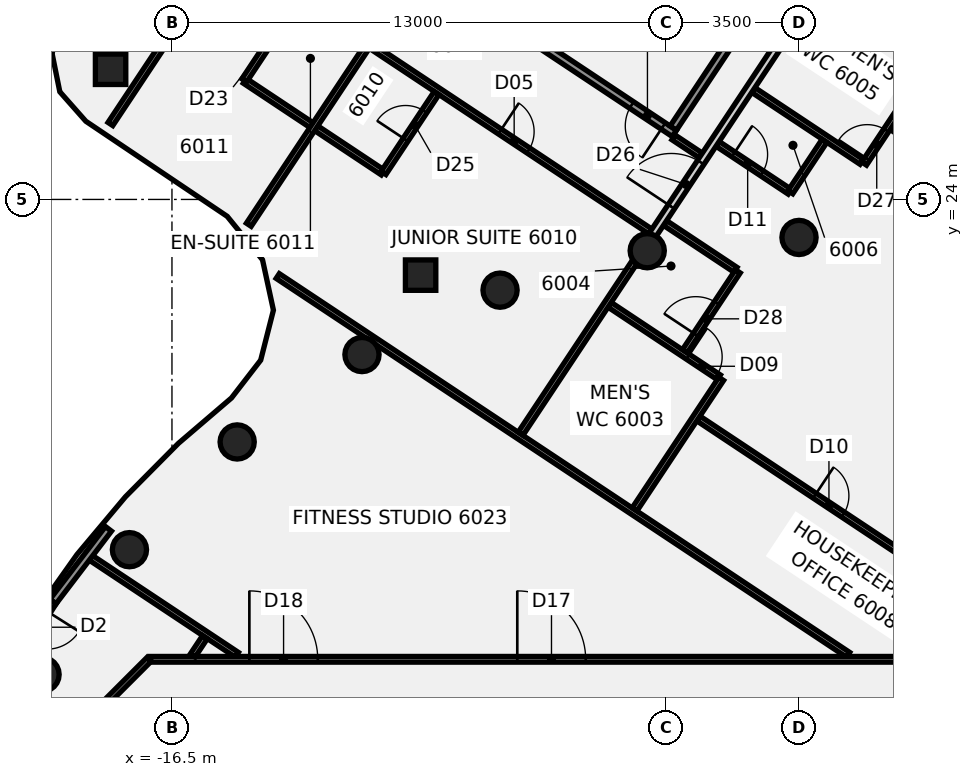
"""IFC4 building model, lengths in metres.
Left out: names, types, materials, properties, quantities, classifications, styles, units other than length and angle.
Written with IfcOpenShell. Run it as: python <this file> out.ifc"""

import sys

from ifc_helpers import new_model, si_unit, direction, frame, frame_2d, origin, origin_2d, place, context, subcontext, project, spatial, rectangle, circle, extrude, element, fill, save


model = new_model("IFC4")
c1 = context("Model", 3, precision=1e-05, world=origin(), true_north=direction((0.0, 1.0)))
c2 = subcontext(c1, "Body", "Model", "MODEL_VIEW")
j1 = project(units=[si_unit("LENGTHUNIT", "METRE"), si_unit("PLANEANGLEUNIT", "RADIAN")], contexts=[c1])
p1 = place(None, origin())
s1 = spatial("IfcSite", under=j1, at=p1, CompositionType="ELEMENT")
p2 = place(p1, origin())
s2 = spatial("IfcBuilding", under=s1, at=p2, CompositionType="ELEMENT")
p3 = place(p2, frame((0.0, 0.0, 237.9)))
s3 = spatial("IfcBuildingStorey", under=s2, at=p3, CompositionType="ELEMENT", Elevation=237.9)
for number, where, z_axis, x_axis in (
    (1, (0.0, 23.0, -0.14), (0.0, 0.0, 1.0), (1.0, 0.0, 0.0)),
    (2, (-3.994, 22.651, -0.14), (0.0, 0.0, 1.0), (1.0, 0.0, 0.0)),
    (3, (-7.866, 21.613, -0.14), (0.0, 0.0, 1.0), (1.0, 0.0, 0.0)),
    (4, (-11.5, 19.919, -0.14), (0.0, 0.0, 1.0), (1.0, 0.0, 0.0)),
    (5, (-14.784, 17.619, -0.14), (0.0, 0.0, 1.0), (1.0, 0.0, 0.0)),
    (6, (-17.619, 14.784, -0.14), (0.0, 0.0, 1.0), (1.0, 0.0, 0.0)),
    (7, (-19.919, 11.5, -0.14), (0.0, 0.0, 1.0), (1.0, 0.0, 0.0)),
):
    element("IfcColumn", number, at=place(p3, frame(where, z_axis=z_axis, x_axis=x_axis)), inside=s3, PredefinedType="COLUMN", context=c2, shape_type="SweptSolid", body=[
        extrude(circle(Radius=0.45, at=origin_2d()), origin(), (0.0, 0.0, 1.0), 3.6),
    ])
p4 = place(p3, frame((-9.957, 22.009, -0.139), z_axis=(0.000406675654, -0.050427781113, 0.998727627287), x_axis=(0.553266552151, 0.831955767854, 0.0417818454)))
e8 = element("IfcColumn", 8, at=p4, inside=s3, PredefinedType="COLUMN", context=c2, shape_type="SweptSolid", body=[
    extrude(rectangle(XDim=0.8, YDim=0.8, at=origin_2d()), origin(), (0.0, 0.0, 1.0), 3.602),
])
p5 = place(p3, frame((-18.115, 27.425, -0.138), z_axis=(0.055423482647, -0.143054315985, 0.988161778379), x_axis=(0.555548549788, 0.826757793949, 0.088528859549)))
e9 = element("IfcColumn", 9, at=p5, inside=s3, PredefinedType="COLUMN", context=c2, shape_type="SweptSolid", body=[
    extrude(rectangle(XDim=0.8, YDim=0.8, at=origin_2d()), origin(), (0.0, 0.0, 1.0), 3.638),
])
p6 = place(p3, frame((-18.663, 14.589, 0.0), z_axis=(0.0, 0.0, 1.0), x_axis=(0.833043201899, -0.553207938997, 0.0)))
e10 = element("IfcWall", 10, at=p6, inside=s3, PredefinedType="PARTITIONING", context=c2, shape_type="SweptSolid", body=[
    extrude(rectangle(XDim=4.647, YDim=0.15, at=frame_2d((2.323, 0.0))), origin(), (0.0, 0.0, 1.0), 2.864),
])
p7 = place(p3, frame((-15.01, 30.525, 0.0), z_axis=(0.0, 0.0, 1.0), x_axis=(0.833117507286, -0.553096030589, 0.0)))
e11 = element("IfcWall", 11, at=p7, inside=s3, PredefinedType="PARTITIONING", context=c2, shape_type="SweptSolid", body=[
    extrude(rectangle(XDim=13.32, YDim=0.15, at=frame_2d((6.66, 0.0))), origin(), (0.0, 0.0, 1.0), 2.864),
])
p8 = place(p7, frame((8.569, 0.0, 0.0)))
e12 = element("IfcOpeningElement", 12, at=p8, cuts=e11, PredefinedType="OPENING", context=c2, shape_type="SweptSolid", body=[
    extrude(rectangle(XDim=0.9, YDim=2.1, at=frame_2d((0.45, 1.05))), frame((0.0, 0.085, 0.0), z_axis=(0.0, -1.0, 0.0), x_axis=(1.0, 0.0, 0.0)), (0.0, 0.0, 1.0), 0.17),
])
p9 = place(p7, frame((0.52, 0.0, 0.0)))
e13 = element("IfcOpeningElement", 13, at=p9, cuts=e11, PredefinedType="OPENING", context=c2, shape_type="SweptSolid", body=[
    extrude(rectangle(XDim=0.9, YDim=2.1, at=frame_2d((0.45, 1.05))), frame((0.0, 0.085, 0.0), z_axis=(0.0, -1.0, 0.0), x_axis=(1.0, 0.0, 0.0)), (0.0, 0.0, 1.0), 0.17),
])
p10 = place(p3, frame((-14.581, 27.12, 0.0), z_axis=(0.0, 0.0, 1.0), x_axis=(0.832953813906, -0.553342519511, 0.0)))
e14 = element("IfcWall", 14, at=p10, inside=s3, PredefinedType="PARTITIONING", context=c2, shape_type="SweptSolid", body=[
    extrude(rectangle(XDim=4.36, YDim=0.15, at=frame_2d((2.18, 0.0))), origin(), (0.0, 0.0, 1.0), 2.864),
])
p11 = place(p3, frame((-3.302, 25.633, 0.0), z_axis=(0.0, 0.0, 1.0), x_axis=(0.833097223734, -0.553126582084, 0.0)))
e15 = element("IfcWall", 15, at=p11, inside=s3, PredefinedType="PARTITIONING", context=c2, shape_type="SweptSolid", body=[
    extrude(rectangle(XDim=0.86, YDim=0.15, at=frame_2d((0.43, 0.0))), origin(), (0.0, 0.0, 1.0), 2.864),
])
p12 = place(p3, frame((-13.717, 21.985, 0.0), z_axis=(0.0, 0.0, 1.0), x_axis=(0.833087033507, -0.553141929891, 0.0)))
e16 = element("IfcWall", 16, at=p12, inside=s3, PredefinedType="PARTITIONING", context=c2, shape_type="SweptSolid", body=[
    extrude(rectangle(XDim=18.017, YDim=0.15, at=frame_2d((9.008, 0.0))), origin(), (0.0, 0.0, 1.0), 2.864),
])
p13 = place(p3, frame((-4.979, 21.225, 0.0), z_axis=(0.0, 0.0, 1.0), x_axis=(0.833117303945, -0.553096336877, 0.0)))
e17 = element("IfcWall", 17, at=p13, inside=s3, PredefinedType="PARTITIONING", context=c2, shape_type="SweptSolid", body=[
    extrude(rectangle(XDim=3.445, YDim=0.15, at=frame_2d((1.722, 0.0))), origin(), (0.0, 0.0, 1.0), 2.864),
])
p14 = place(p13, frame((2.469, 0.0, 0.0)))
e18 = element("IfcOpeningElement", 18, at=p14, cuts=e17, PredefinedType="OPENING", context=c2, shape_type="SweptSolid", body=[
    extrude(rectangle(XDim=0.9, YDim=2.1, at=frame_2d((0.45, 1.05))), frame((0.0, 0.085, 0.0), z_axis=(0.0, -1.0, 0.0), x_axis=(1.0, 0.0, 0.0)), (0.0, 0.0, 1.0), 0.17),
])
p15 = place(p3, frame((-3.525, 23.38, 0.0), z_axis=(0.0, 0.0, 1.0), x_axis=(0.83314621035, -0.553052793302, 0.0)))
e19 = element("IfcWall", 19, at=p15, inside=s3, PredefinedType="PARTITIONING", context=c2, shape_type="SweptSolid", body=[
    extrude(rectangle(XDim=2.224, YDim=0.15, at=frame_2d((1.112, 0.0))), origin(), (0.0, 0.0, 1.0), 2.864),
])
p16 = place(p3, frame((-2.644, 18.234, 0.0), z_axis=(0.0, 0.0, 1.0), x_axis=(0.833101748675, -0.553119766737, 0.0)))
e20 = element("IfcWall", 20, at=p16, inside=s3, PredefinedType="PARTITIONING", context=c2, shape_type="SweptSolid", body=[
    extrude(rectangle(XDim=11.236, YDim=0.15, at=frame_2d((5.618, 0.0))), origin(), (0.0, 0.0, 1.0), 2.864),
])
p17 = place(p16, frame((3.67, 0.0, 0.0)))
e21 = element("IfcOpeningElement", 21, at=p17, cuts=e20, PredefinedType="OPENING", context=c2, shape_type="SweptSolid", body=[
    extrude(rectangle(XDim=0.9, YDim=2.1, at=frame_2d((0.45, 1.05))), frame((0.0, 0.085, 0.0), z_axis=(0.0, -1.0, 0.0), x_axis=(1.0, 0.0, 0.0)), (0.0, 0.0, 1.0), 0.17),
])
p18 = place(p3, frame((-2.138, 25.46, 0.0), z_axis=(0.0, 0.0, 1.0), x_axis=(0.833269970846, -0.552866309053, 0.0)))
e22 = element("IfcWall", 22, at=p18, inside=s3, PredefinedType="PARTITIONING", context=c2, shape_type="SweptSolid", body=[
    extrude(rectangle(XDim=2.275, YDim=0.15, at=frame_2d((1.138, 0.0))), origin(), (0.0, 0.0, 1.0), 2.864),
])
p19 = place(p18, frame((0.495, 0.0, 0.0)))
e23 = element("IfcOpeningElement", 23, at=p19, cuts=e22, PredefinedType="OPENING", context=c2, shape_type="SweptSolid", body=[
    extrude(rectangle(XDim=0.9, YDim=2.1, at=frame_2d((0.45, 1.05))), frame((0.0, 0.085, 0.0), z_axis=(0.0, -1.0, 0.0), x_axis=(1.0, 0.0, 0.0)), (0.0, 0.0, 1.0), 0.17),
])
p20 = place(p3, frame((-1.202, 26.879, 0.0), z_axis=(0.0, 0.0, 1.0), x_axis=(0.8331360396, -0.55306811472, 0.0)))
e24 = element("IfcWall", 24, at=p20, inside=s3, PredefinedType="PARTITIONING", context=c2, shape_type="SweptSolid", body=[
    extrude(rectangle(XDim=3.42, YDim=0.15, at=frame_2d((1.71, 0.0))), origin(), (0.0, 0.0, 1.0), 2.864),
])
p21 = place(p3, frame((2.445, 25.899, 0.0), z_axis=(0.0, 0.0, 1.0), x_axis=(0.832974807339, -0.553310916519, 0.0)))
e25 = element("IfcWall", 25, at=p21, inside=s3, PredefinedType="PARTITIONING", context=c2, shape_type="SweptSolid", body=[
    extrude(rectangle(XDim=1.014, YDim=0.15, at=frame_2d((0.507, 0.0))), origin(), (0.0, 0.0, 1.0), 2.864),
])
p22 = place(p3, frame((-17.065, 11.9, 0.0), z_axis=(0.0, 0.0, 1.0), x_axis=(1.0, 0.0, 0.0)))
e26 = element("IfcWall", 26, at=p22, inside=s3, PredefinedType="PARTITIONING", context=c2, shape_type="SweptSolid", body=[
    extrude(rectangle(XDim=34.165, YDim=0.15, at=frame_2d((17.083, 0.0))), origin(), (0.0, 0.0, 1.0), 2.864),
])
p23 = place(p22, frame((24.711, 0.0, 0.0)))
e27 = element("IfcOpeningElement", 27, at=p23, cuts=e26, PredefinedType="OPENING", context=c2, shape_type="SweptSolid", body=[
    extrude(rectangle(XDim=1.8, YDim=2.1, at=frame_2d((0.9, 1.05))), frame((0.0, 0.085, 0.0), z_axis=(0.0, -1.0, 0.0), x_axis=(1.0, 0.0, 0.0)), (0.0, 0.0, 1.0), 0.17),
])
p24 = place(p22, frame((9.652, 0.0, 0.0)))
e28 = element("IfcOpeningElement", 28, at=p24, cuts=e26, PredefinedType="OPENING", context=c2, shape_type="SweptSolid", body=[
    extrude(rectangle(XDim=1.8, YDim=2.1, at=frame_2d((0.9, 1.05))), frame((0.0, 0.085, 0.0), z_axis=(0.0, -1.0, 0.0), x_axis=(1.0, 0.0, 0.0)), (0.0, 0.0, 1.0), 0.17),
])
p25 = place(p22, frame((2.602, 0.0, 0.0)))
e29 = element("IfcOpeningElement", 29, at=p25, cuts=e26, PredefinedType="OPENING", context=c2, shape_type="SweptSolid", body=[
    extrude(rectangle(XDim=1.8, YDim=2.1, at=frame_2d((0.9, 1.05))), frame((0.0, 0.085, 0.0), z_axis=(0.0, -1.0, 0.0), x_axis=(1.0, 0.0, 0.0)), (0.0, 0.0, 1.0), 0.17),
])
p26 = place(p3, frame((-18.872, 10.128, 0.0), z_axis=(0.0, 0.0, 1.0), x_axis=(0.707106781187, 0.707106781187, 0.0)))
e30 = element("IfcWall", 30, at=p26, inside=s3, PredefinedType="PARTITIONING", context=c2, shape_type="SweptSolid", body=[
    extrude(rectangle(XDim=2.505, YDim=0.15, at=frame_2d((1.253, 0.0))), origin(), (0.0, 0.0, 1.0), 2.864),
])
p27 = place(p3, frame((-15.954, 12.0, 0.0), z_axis=(0.0, 0.0, 1.0), x_axis=(0.55314016621, 0.833088204529, 0.0)))
e31 = element("IfcWall", 31, at=p27, inside=s3, PredefinedType="PARTITIONING", context=c2, shape_type="SweptSolid", body=[
    extrude(rectangle(XDim=0.578, YDim=0.15, at=frame_2d((0.289, 0.0))), origin(), (0.0, 0.0, 1.0), 2.864),
])
p28 = place(p3, frame((-18.119, 25.985, 0.0), z_axis=(0.0, 0.0, 1.0), x_axis=(0.55309744158, 0.833116570546, 0.0)))
e32 = element("IfcWall", 32, at=p28, inside=s3, PredefinedType="PARTITIONING", context=c2, shape_type="SweptSolid", body=[
    extrude(rectangle(XDim=13.402, YDim=0.15, at=frame_2d((6.701, 0.0))), origin(), (0.0, 0.0, 1.0), 2.864),
])
p29 = place(p28, frame((2.429, 0.0, 0.0)))
e33 = element("IfcOpeningElement", 33, at=p29, cuts=e32, PredefinedType="OPENING", context=c2, shape_type="SweptSolid", body=[
    extrude(rectangle(XDim=1.8, YDim=2.1, at=frame_2d((0.9, 1.05))), frame((0.0, 0.085, 0.0), z_axis=(0.0, -1.0, 0.0), x_axis=(1.0, 0.0, 0.0)), (0.0, 0.0, 1.0), 0.17),
])
p30 = place(p3, frame((-14.598, 27.131, 0.0), z_axis=(0.0, 0.0, 1.0), x_axis=(0.553111776715, 0.83310705342, 0.0)))
e34 = element("IfcWall", 34, at=p30, inside=s3, PredefinedType="PARTITIONING", context=c2, shape_type="SweptSolid", body=[
    extrude(rectangle(XDim=2.52, YDim=0.15, at=frame_2d((1.26, 0.0))), origin(), (0.0, 0.0, 1.0), 2.864),
])
p31 = place(p30, frame((1.05, 0.0, 0.0)))
e35 = element("IfcOpeningElement", 35, at=p31, cuts=e34, PredefinedType="OPENING", context=c2, shape_type="SweptSolid", body=[
    extrude(rectangle(XDim=0.9, YDim=2.1, at=frame_2d((0.45, 1.05))), frame((0.0, 0.085, 0.0), z_axis=(0.0, -1.0, 0.0), x_axis=(1.0, 0.0, 0.0)), (0.0, 0.0, 1.0), 0.17),
])
p32 = place(p3, frame((-14.479, 23.334, 0.0), z_axis=(0.0, 0.0, 1.0), x_axis=(0.553003913991, 0.833178654978, 0.0)))
e36 = element("IfcWall", 36, at=p32, inside=s3, PredefinedType="PARTITIONING", context=c2, shape_type="SweptSolid", body=[
    extrude(rectangle(XDim=5.617, YDim=0.15, at=frame_2d((2.809, 0.0))), origin(), (0.0, 0.0, 1.0), 2.864),
])
p33 = place(p3, frame((-10.933, 24.697, 0.0), z_axis=(0.0, 0.0, 1.0), x_axis=(0.553111776715, 0.83310705342, 0.0)))
e37 = element("IfcWall", 37, at=p33, inside=s3, PredefinedType="PARTITIONING", context=c2, shape_type="SweptSolid", body=[
    extrude(rectangle(XDim=2.52, YDim=0.15, at=frame_2d((1.26, 0.0))), origin(), (0.0, 0.0, 1.0), 2.864),
])
p34 = place(p33, frame((1.05, 0.0, 0.0)))
e38 = element("IfcOpeningElement", 38, at=p34, cuts=e37, PredefinedType="OPENING", context=c2, shape_type="SweptSolid", body=[
    extrude(rectangle(XDim=0.9, YDim=2.1, at=frame_2d((0.45, 1.05))), frame((0.0, 0.085, 0.0), z_axis=(0.0, -1.0, 0.0), x_axis=(1.0, 0.0, 0.0)), (0.0, 0.0, 1.0), 0.17),
])
p35 = place(p3, frame((-7.325, 17.837, 0.0), z_axis=(0.0, 0.0, 1.0), x_axis=(0.553097438288, 0.833116572731, 0.0)))
e39 = element("IfcWall", 39, at=p35, inside=s3, PredefinedType="PARTITIONING", context=c2, shape_type="SweptSolid", body=[
    extrude(rectangle(XDim=5.628, YDim=0.15, at=frame_2d((2.814, 0.0))), origin(), (0.0, 0.0, 1.0), 2.864),
])
p36 = place(p3, frame((-3.963, 22.9, 0.0), z_axis=(0.0, 0.0, 1.0), x_axis=(0.553100489326, 0.833114547171, 0.0)))
e40 = element("IfcWall", 40, at=p36, inside=s3, PredefinedType="PARTITIONING", context=c2, shape_type="SweptSolid", body=[
    extrude(rectangle(XDim=8.141, YDim=0.2, at=frame_2d((4.07, 0.0))), origin(), (0.0, 0.0, 1.0), 2.864),
])
p37 = place(p36, frame((1.092, 0.0, 0.0)))
e41 = element("IfcOpeningElement", 41, at=p37, cuts=e40, PredefinedType="OPENING", context=c2, shape_type="SweptSolid", body=[
    extrude(rectangle(XDim=1.4, YDim=2.1, at=frame_2d((0.7, 1.05))), frame((0.0, 0.11, 0.0), z_axis=(0.0, -1.0, 0.0), x_axis=(1.0, 0.0, 0.0)), (0.0, 0.0, 1.0), 0.22),
])
p38 = place(p3, frame((-4.326, 15.846, 0.0), z_axis=(0.0, 0.0, 1.0), x_axis=(0.55307176982, 0.83313361319, 0.0)))
e42 = element("IfcWall", 42, at=p38, inside=s3, PredefinedType="PARTITIONING", context=c2, shape_type="SweptSolid", body=[
    extrude(rectangle(XDim=4.12, YDim=0.15, at=frame_2d((2.06, 0.0))), origin(), (0.0, 0.0, 1.0), 2.864),
])
p39 = place(p3, frame((1.714, 24.943, 0.0), z_axis=(0.0, 0.0, 1.0), x_axis=(0.55306516675, 0.833137996569, 0.0)))
e43 = element("IfcWall", 43, at=p39, inside=s3, PredefinedType="PARTITIONING", context=c2, shape_type="SweptSolid", body=[
    extrude(rectangle(XDim=2.483, YDim=0.15, at=frame_2d((1.241, 0.0))), origin(), (0.0, 0.0, 1.0), 2.864),
])
p40 = place(p39, frame((0.15, 0.0, 0.0)))
e44 = element("IfcOpeningElement", 44, at=p40, cuts=e43, PredefinedType="OPENING", context=c2, shape_type="SweptSolid", body=[
    extrude(rectangle(XDim=0.9, YDim=2.1, at=frame_2d((0.45, 1.05))), frame((0.0, 0.085, 0.0), z_axis=(0.0, -1.0, 0.0), x_axis=(1.0, 0.0, 0.0)), (0.0, 0.0, 1.0), 0.17),
])
p41 = place(p3, frame((-3.003, 20.009, 0.0), z_axis=(0.0, 0.0, 1.0), x_axis=(0.553111776715, 0.83310705342, 0.0)))
e45 = element("IfcWall", 45, at=p41, inside=s3, PredefinedType="PARTITIONING", context=c2, shape_type="SweptSolid", body=[
    extrude(rectangle(XDim=2.52, YDim=0.15, at=frame_2d((1.26, 0.0))), origin(), (0.0, 0.0, 1.0), 2.864),
])
p42 = place(p41, frame((0.52, 0.0, 0.0)))
e46 = element("IfcOpeningElement", 46, at=p42, cuts=e45, PredefinedType="OPENING", context=c2, shape_type="SweptSolid", body=[
    extrude(rectangle(XDim=1.0, YDim=2.1, at=frame_2d((0.5, 1.05))), frame((0.0, 0.085, 0.0), z_axis=(0.0, -1.0, 0.0), x_axis=(1.0, 0.0, 0.0)), (0.0, 0.0, 1.0), 0.17),
])
p43 = place(p3, frame((-0.226, 24.191, 0.0), z_axis=(0.0, 0.0, 1.0), x_axis=(0.55306417873, 0.83313865245, 0.0)))
e47 = element("IfcWall", 47, at=p43, inside=s3, PredefinedType="PARTITIONING", context=c2, shape_type="SweptSolid", body=[
    extrude(rectangle(XDim=1.62, YDim=0.15, at=frame_2d((0.81, 0.0))), origin(), (0.0, 0.0, 1.0), 2.864),
])
p44 = place(p3, frame((-18.171, 15.332, 0.0), z_axis=(0.0, 0.0, 1.0), x_axis=(-0.606394798993, -0.795163723867, 0.0)))
e48 = element("IfcWall", 48, at=p44, inside=s3, PredefinedType="SOLIDWALL", context=c2, shape_type="SweptSolid", body=[
    extrude(rectangle(XDim=2.406, YDim=0.2, at=frame_2d((1.203, 0.0))), origin(), (0.0, 0.0, 1.0), 3.46),
])
p45 = place(p3, frame((-19.63, 13.419, 0.0), z_axis=(0.0, 0.0, 1.0), x_axis=(-0.534630584226, -0.845085876352, 0.0)))
e49 = element("IfcWall", 49, at=p45, inside=s3, PredefinedType="SOLIDWALL", context=c2, shape_type="SweptSolid", body=[
    extrude(rectangle(XDim=1.599, YDim=0.2, at=frame_2d((0.799, 0.0))), origin(), (0.0, 0.0, 1.0), 3.46),
])
p46 = place(p45, frame((0.299, 0.0, 0.0)))
e50 = element("IfcOpeningElement", 50, at=p46, cuts=e49, PredefinedType="OPENING", context=c2, shape_type="SweptSolid", body=[
    extrude(rectangle(XDim=1.0, YDim=2.4, at=frame_2d((0.5, 1.2))), frame((0.0, 0.11, 0.0), z_axis=(0.0, -1.0, 0.0), x_axis=(1.0, 0.0, 0.0)), (0.0, 0.0, 1.0), 0.22),
])
p47 = place(p3, frame((-3.28, 25.738, -0.14), z_axis=(0.0, 0.0, 1.0), x_axis=(-0.833119462199, 0.553093085931, 0.0)))
e51 = element("IfcWall", 51, at=p47, inside=s3, PredefinedType="SHEAR", context=c2, shape_type="SweptSolid", body=[
    extrude(rectangle(XDim=6.7, YDim=0.2, at=frame_2d((3.35, 0.0))), origin(), (0.0, 0.0, 1.0), 3.004),
])
p48 = place(p47, frame((0.35, 0.0, 0.0)))
e52 = element("IfcOpeningElement", 52, at=p48, cuts=e51, PredefinedType="OPENING", context=c2, shape_type="SweptSolid", body=[
    extrude(rectangle(XDim=1.0, YDim=2.1, at=frame_2d((0.5, 1.05))), frame((0.0, 0.11, 0.0), z_axis=(0.0, -1.0, 0.0), x_axis=(1.0, 0.0, 0.0)), (0.0, 0.0, 1.0), 0.22),
])
p49 = place(p3, frame((-1.538, 28.542, -0.14), z_axis=(0.0, 0.0, 1.0), x_axis=(-0.553149828065, -0.833081789329, 0.0)))
e53 = element("IfcWall", 53, at=p49, inside=s3, PredefinedType="SHEAR", context=c2, shape_type="SweptSolid", body=[
    extrude(rectangle(XDim=3.2, YDim=0.2, at=frame_2d((1.6, 0.0))), origin(), (0.0, 0.0, 1.0), 3.6),
])
p50 = place(p8, frame((0.9, 0.0, 0.0), z_axis=(0.0, 0.0, 1.0), x_axis=(-1.0, 0.0, 0.0)))
e54 = element("IfcDoor", 54, at=p50, inside=s3, OperationType="SINGLE_SWING_RIGHT", PredefinedType="DOOR", context=c2, shape_type="SweptSolid", body=[
    extrude(rectangle(XDim=0.9, YDim=2.1, at=frame_2d((0.45, 1.05))), frame((0.0, 0.025, 0.0), z_axis=(0.0, -1.0, 0.0), x_axis=(1.0, 0.0, 0.0)), (0.0, 0.0, 1.0), 0.05),
])
fill(e12, e54)
p51 = place(p14, frame((0.9, 0.0, 0.0), z_axis=(0.0, 0.0, 1.0), x_axis=(-1.0, 0.0, 0.0)))
e55 = element("IfcDoor", 55, at=p51, inside=s3, OperationType="SINGLE_SWING_RIGHT", PredefinedType="DOOR", context=c2, shape_type="SweptSolid", body=[
    extrude(rectangle(XDim=0.9, YDim=2.1, at=frame_2d((0.45, 1.05))), frame((0.0, 0.025, 0.0), z_axis=(0.0, -1.0, 0.0), x_axis=(1.0, 0.0, 0.0)), (0.0, 0.0, 1.0), 0.05),
])
fill(e18, e55)
p52 = place(p17, frame((0.9, 0.0, 0.0), z_axis=(0.0, 0.0, 1.0), x_axis=(-1.0, 0.0, 0.0)))
e56 = element("IfcDoor", 56, at=p52, inside=s3, OperationType="SINGLE_SWING_LEFT", PredefinedType="DOOR", context=c2, shape_type="SweptSolid", body=[
    extrude(rectangle(XDim=0.9, YDim=2.1, at=frame_2d((0.45, 1.05))), frame((0.0, 0.025, 0.0), z_axis=(0.0, -1.0, 0.0), x_axis=(1.0, 0.0, 0.0)), (0.0, 0.0, 1.0), 0.05),
])
fill(e21, e56)
p53 = place(p19, origin())
e57 = element("IfcDoor", 57, at=p53, inside=s3, OperationType="SINGLE_SWING_RIGHT", PredefinedType="DOOR", context=c2, shape_type="SweptSolid", body=[
    extrude(rectangle(XDim=0.9, YDim=2.1, at=frame_2d((0.45, 1.05))), frame((0.0, 0.025, 0.0), z_axis=(0.0, -1.0, 0.0), x_axis=(1.0, 0.0, 0.0)), (0.0, 0.0, 1.0), 0.05),
])
fill(e23, e57)
p54 = place(p24, origin())
e58 = element("IfcDoor", 58, at=p54, inside=s3, OperationType="DOUBLE_DOOR_SINGLE_SWING", PredefinedType="DOOR", context=c2, shape_type="SweptSolid", body=[
    extrude(rectangle(XDim=1.8, YDim=2.1, at=frame_2d((0.9, 1.05))), frame((0.0, 0.025, 0.0), z_axis=(0.0, -1.0, 0.0), x_axis=(1.0, 0.0, 0.0)), (0.0, 0.0, 1.0), 0.05),
])
fill(e28, e58)
p55 = place(p25, origin())
e59 = element("IfcDoor", 59, at=p55, inside=s3, OperationType="DOUBLE_DOOR_SINGLE_SWING", PredefinedType="DOOR", context=c2, shape_type="SweptSolid", body=[
    extrude(rectangle(XDim=1.8, YDim=2.1, at=frame_2d((0.9, 1.05))), frame((0.0, 0.025, 0.0), z_axis=(0.0, -1.0, 0.0), x_axis=(1.0, 0.0, 0.0)), (0.0, 0.0, 1.0), 0.05),
])
fill(e29, e59)
p56 = place(p34, origin())
e60 = element("IfcDoor", 60, at=p56, inside=s3, OperationType="SINGLE_SWING_LEFT", PredefinedType="DOOR", context=c2, shape_type="SweptSolid", body=[
    extrude(rectangle(XDim=0.9, YDim=2.1, at=frame_2d((0.45, 1.05))), frame((0.0, 0.025, 0.0), z_axis=(0.0, -1.0, 0.0), x_axis=(1.0, 0.0, 0.0)), (0.0, 0.0, 1.0), 0.05),
])
fill(e38, e60)
p57 = place(p37, frame((1.4, 0.0, 0.0), z_axis=(0.0, 0.0, 1.0), x_axis=(-1.0, 0.0, 0.0)))
e61 = element("IfcDoor", 61, at=p57, inside=s3, OperationType="DOUBLE_DOOR_SINGLE_SWING", PredefinedType="DOOR", context=c2, shape_type="SweptSolid", body=[
    extrude(rectangle(XDim=1.4, YDim=2.1, at=frame_2d((0.7, 1.05))), frame((0.0, 0.025, 0.0), z_axis=(0.0, -1.0, 0.0), x_axis=(1.0, 0.0, 0.0)), (0.0, 0.0, 1.0), 0.05),
])
fill(e41, e61)
p58 = place(p40, origin())
e62 = element("IfcDoor", 62, at=p58, inside=s3, OperationType="SINGLE_SWING_RIGHT", PredefinedType="DOOR", context=c2, shape_type="SweptSolid", body=[
    extrude(rectangle(XDim=0.9, YDim=2.1, at=frame_2d((0.45, 1.05))), frame((0.0, 0.025, 0.0), z_axis=(0.0, -1.0, 0.0), x_axis=(1.0, 0.0, 0.0)), (0.0, 0.0, 1.0), 0.05),
])
fill(e44, e62)
p59 = place(p42, origin())
e63 = element("IfcDoor", 63, at=p59, inside=s3, OperationType="SINGLE_SWING_RIGHT", PredefinedType="DOOR", context=c2, shape_type="SweptSolid", body=[
    extrude(rectangle(XDim=1.0, YDim=2.1, at=frame_2d((0.5, 1.05))), frame((0.0, 0.025, 0.0), z_axis=(0.0, -1.0, 0.0), x_axis=(1.0, 0.0, 0.0)), (0.0, 0.0, 1.0), 0.05),
])
fill(e46, e63)
p60 = place(p48, origin())
e64 = element("IfcDoor", 64, at=p60, inside=s3, OperationType="SINGLE_SWING_LEFT", PredefinedType="DOOR", context=c2, shape_type="SweptSolid", body=[
    extrude(rectangle(XDim=1.0, YDim=2.1, at=frame_2d((0.5, 1.05))), frame((0.0, 0.025, 0.0), z_axis=(0.0, -1.0, 0.0), x_axis=(1.0, 0.0, 0.0)), (0.0, 0.0, 1.0), 0.05),
])
fill(e52, e64)
save(model, sys.argv[1])
